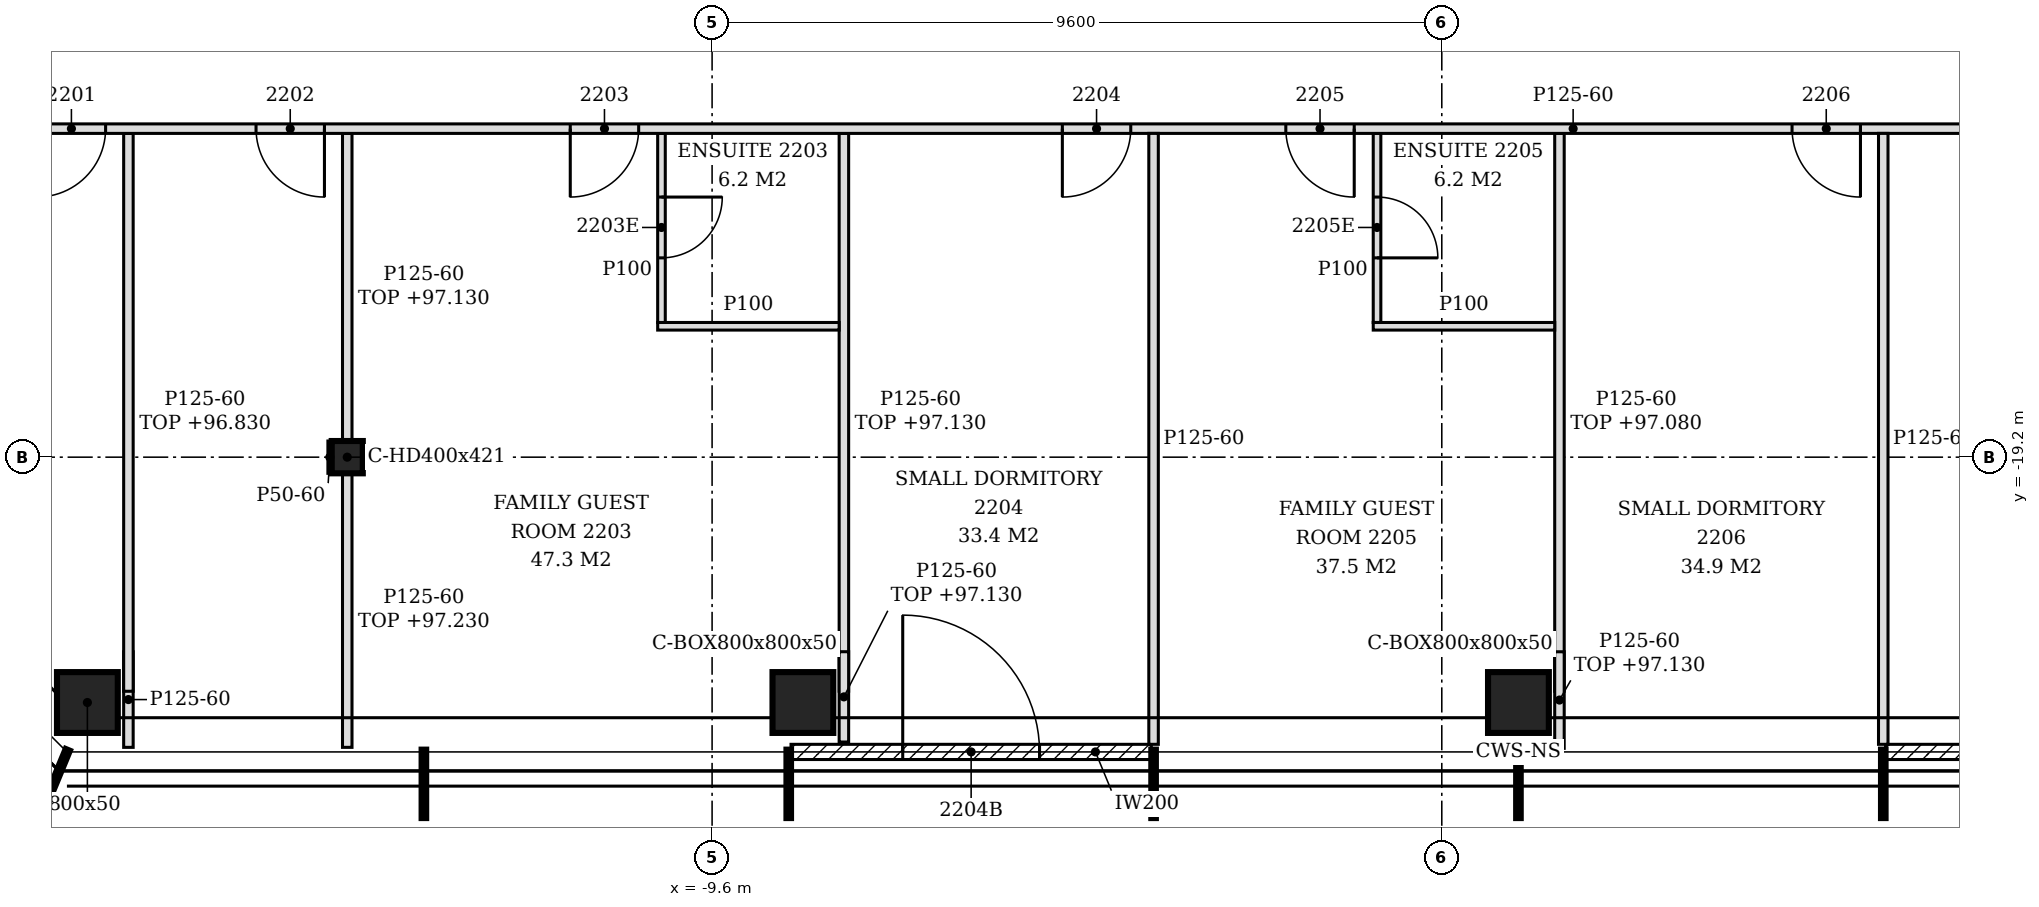
"""IFC4 building model, lengths in metres.
Left out: names, types, materials, properties, quantities, classifications, styles, units other than length and angle.
Written with IfcOpenShell. Run it as: python <this file> out.ifc"""

import sys

from ifc_helpers import new_model, si_unit, direction, frame, frame_2d, origin, origin_2d, place, context, subcontext, project, spatial, polyline, rectangle, hollow_rectangle, i_section, outline, extrude, clip, halfspace, element, fill, save


model = new_model("IFC4")
c1 = context("Model", 3, precision=1e-05, world=origin(), true_north=direction((0.0, 1.0)))
c2 = subcontext(c1, "Body", "Model", "MODEL_VIEW")
j1 = project(units=[si_unit("LENGTHUNIT", "METRE"), si_unit("PLANEANGLEUNIT", "RADIAN")], contexts=[c1])
p1 = place(None, origin())
s1 = spatial("IfcSite", under=j1, at=p1, CompositionType="ELEMENT")
p2 = place(p1, origin())
s2 = spatial("IfcBuilding", under=s1, at=p2, CompositionType="ELEMENT")
p3 = place(p2, frame((0.0, 0.0, 94.2)))
s3 = spatial("IfcBuildingStorey", under=s2, at=p3, CompositionType="ELEMENT", Elevation=94.2)
for number, where, z_axis, x_axis in (
    (1, (-17.819, -22.428, -0.15), (0.282, 0.188, 0.941), (-0.555, 0.832, 0.0)),
    (2, (-8.405, -22.428, -0.15), (0.282, 0.188, 0.941), (-0.555, 0.832, 0.0)),
    (3, (1.008, -22.428, -0.15), (0.282, 0.188, 0.941), (-0.555, 0.832, 0.0)),
):
    element("IfcColumn", number, at=place(p3, frame(where, z_axis=z_axis, x_axis=x_axis)), inside=s3, PredefinedType="COLUMN", context=c2, shape_type="Clipping", body=[
        clip(clip(extrude(hollow_rectangle(XDim=0.8, YDim=0.8, WallThickness=0.05, at=origin_2d()), origin(), (0.0, 0.0, 1.0), 3.826), halfspace(frame((0.0, 0.0, 0.024), z_axis=(0.0, 0.0, 1.0), x_axis=(1.0, 0.0, 0.0)), True)), halfspace(frame((0.0, 0.0, 3.802), z_axis=(0.0, 0.0, 1.0), x_axis=(1.0, 0.0, 0.0)), False)),
    ])
p4 = place(p3, frame((-14.4, -19.2, -0.15), z_axis=(0.0, 0.0, 1.0), x_axis=(1.0, 0.0, 0.0)))
e4 = element("IfcColumn", 4, at=p4, inside=s3, PredefinedType="COLUMN", context=c2, shape_type="SweptSolid", body=[
    extrude(i_section(OverallWidth=0.409, OverallDepth=0.425, WebThickness=0.033, FlangeThickness=0.052, FilletRadius=0.015, at=origin_2d()), origin(), (0.0, 0.0, 1.0), 3.6),
])
p5 = place(p3, frame((-8.562, -23.078, 0.0), z_axis=(0.0, 0.0, 1.0), x_axis=(1.0, 0.0, 0.0)))
e5 = element("IfcWall", 5, at=p5, inside=s3, PredefinedType="NOTDEFINED", context=c2, shape_type="SweptSolid", body=[
    extrude(rectangle(XDim=4.74, YDim=0.2, at=frame_2d((2.37, 0.0))), origin(), (0.0, 0.0, 1.0), 3.45),
])
p6 = place(p5, frame((1.47, 0.0, 0.0)))
e6 = element("IfcOpeningElement", 6, at=p6, cuts=e5, PredefinedType="OPENING", context=c2, shape_type="SweptSolid", body=[
    extrude(rectangle(XDim=1.8, YDim=2.4, at=frame_2d((0.9, 1.2))), frame((0.0, 0.11, 0.0), z_axis=(0.0, -1.0, 0.0), x_axis=(1.0, 0.0, 0.0)), (0.0, 0.0, 1.0), 0.22),
])
p7 = place(p3, frame((5.838, -23.078, 0.0), z_axis=(0.0, 0.0, 1.0), x_axis=(1.0, 0.0, 0.0)))
e7 = element("IfcWall", 7, at=p7, inside=s3, PredefinedType="NOTDEFINED", context=c2, shape_type="SweptSolid", body=[
    extrude(rectangle(XDim=4.74, YDim=0.2, at=frame_2d((2.37, 0.0))), origin(), (0.0, 0.0, 1.0), 3.45),
])
p8 = place(p7, frame((1.17, 0.0, 0.0)))
e8 = element("IfcOpeningElement", 8, at=p8, cuts=e7, PredefinedType="OPENING", context=c2, shape_type="SweptSolid", body=[
    extrude(rectangle(XDim=2.4, YDim=2.4, at=frame_2d((1.2, 1.2))), frame((0.0, 0.11, 0.0), z_axis=(0.0, -1.0, 0.0), x_axis=(1.0, 0.0, 0.0)), (0.0, 0.0, 1.0), 0.22),
])
p9 = place(p3, frame((-17.279, -23.018, 0.0), z_axis=(0.0, 0.0, 1.0), x_axis=(0.0, 1.0, 0.0)))
e9 = element("IfcWall", 9, at=p9, inside=s3, PredefinedType="PARTITIONING", context=c2, shape_type="SweptSolid", body=[
    extrude(outline(polyline([(0.0, 0.0), (0.427, 0.0), (0.427, 0.863), (0.427, 1.725), (0.697, 2.588), (1.257, 3.45), (0.0, 3.45), (0.0, 2.588), (0.0, 1.725), (0.0, 0.863), (0.0, 0.0)])), frame((0.0, 0.062, 0.0), z_axis=(0.0, -1.0, 0.0), x_axis=(1.0, 0.0, 0.0)), (0.0, 0.0, 1.0), 0.125),
])
p10 = place(p3, frame((-14.4, -23.018, 0.0), z_axis=(0.0, 0.0, 1.0), x_axis=(0.0, 1.0, 0.0)))
e10 = element("IfcWall", 10, at=p10, inside=s3, PredefinedType="PARTITIONING", context=c2, shape_type="SweptSolid", body=[
    extrude(outline(polyline([(0.0, 0.0), (3.605, 0.0), (3.605, 3.03), (1.459, 3.03), (1.457, 2.93), (1.159, 2.93), (1.157, 3.03), (0.0, 3.03), (0.0, 0.0)])), frame((0.0, 0.062, 0.0), z_axis=(0.0, -1.0, 0.0), x_axis=(1.0, 0.0, 0.0)), (0.0, 0.0, 1.0), 0.125),
])
p11 = place(p3, frame((-3.792, -22.978, 0.0), z_axis=(0.0, 0.0, 1.0), x_axis=(0.0, 1.0, 0.0)))
e11 = element("IfcWall", 11, at=p11, inside=s3, PredefinedType="PARTITIONING", context=c2, shape_type="SweptSolid", body=[
    extrude(outline(polyline([(0.0, 0.0), (8.037, 0.0), (8.037, 3.45), (5.274, 3.45), (5.272, 2.88), (5.064, 2.88), (5.062, 3.45), (1.419, 3.45), (1.417, 2.93), (1.119, 2.93), (1.117, 3.45), (0.0, 3.45), (0.0, 0.0)])), frame((0.0, 0.062, 0.0), z_axis=(0.0, -1.0, 0.0), x_axis=(1.0, 0.0, 0.0)), (0.0, 0.0, 1.0), 0.125),
])
p12 = place(p3, frame((1.548, -23.031, 0.0), z_axis=(0.0, 0.0, 1.0), x_axis=(0.0, 1.0, 0.0)))
e12 = element("IfcWall", 12, at=p12, inside=s3, PredefinedType="PARTITIONING", context=c2, shape_type="SweptSolid", body=[
    extrude(outline(polyline([(0.0, 0.0), (0.44, 0.0), (0.44, 0.863), (0.44, 1.725), (0.711, 2.588), (0.933, 2.93), (0.0, 2.93), (0.0, 2.588), (0.0, 1.725), (0.0, 0.863), (0.0, 0.0)])), frame((0.0, 0.062, 0.0), z_axis=(0.0, -1.0, 0.0), x_axis=(1.0, 0.0, 0.0)), (0.0, 0.0, 1.0), 0.125),
])
p13 = place(p3, frame((5.808, -22.978, 0.0), z_axis=(0.0, 0.0, 1.0), x_axis=(0.0, 1.0, 0.0)))
e13 = element("IfcWall", 13, at=p13, inside=s3, PredefinedType="PARTITIONING", context=c2, shape_type="SweptSolid", body=[
    extrude(outline(polyline([(0.0, 0.0), (8.037, 0.0), (8.037, 3.45), (5.274, 3.45), (5.272, 2.88), (5.064, 2.88), (5.062, 3.45), (1.419, 3.45), (1.417, 2.93), (1.119, 2.93), (1.117, 3.45), (0.0, 3.45), (0.0, 0.0)])), frame((0.0, 0.062, 0.0), z_axis=(0.0, -1.0, 0.0), x_axis=(1.0, 0.0, 0.0)), (0.0, 0.0, 1.0), 0.125),
])
p14 = place(p3, frame((-7.866, -22.948, 0.0), z_axis=(0.0, 0.0, 1.0), x_axis=(0.0, 1.0, 0.0)))
e14 = element("IfcWall", 14, at=p14, inside=s3, PredefinedType="PARTITIONING", context=c2, shape_type="SweptSolid", body=[
    extrude(outline(polyline([(0.0, 0.0), (0.357, 0.0), (0.357, 0.863), (0.357, 1.725), (0.628, 2.588), (0.851, 2.93), (0.0, 2.93), (0.0, 2.588), (0.0, 1.725), (0.0, 0.863), (0.0, 0.0)])), frame((0.0, 0.062, 0.0), z_axis=(0.0, -1.0, 0.0), x_axis=(1.0, 0.0, 0.0)), (0.0, 0.0, 1.0), 0.125),
])
p15 = place(p3, frame((-17.279, -22.28, 0.0), z_axis=(0.0, 0.0, 1.0), x_axis=(0.0, 1.0, 0.0)))
e15 = element("IfcWall", 15, at=p15, inside=s3, PredefinedType="PARTITIONING", context=c2, shape_type="SweptSolid", body=[
    extrude(outline(polyline([(0.0, 0.0), (7.339, 0.0), (7.339, 0.863), (7.339, 1.725), (7.339, 2.588), (7.339, 2.63), (0.734, 2.63), (0.734, 2.588), (0.734, 1.725), (0.56, 0.863), (0.0, 0.0)])), frame((0.0, 0.062, 0.0), z_axis=(0.0, -1.0, 0.0), x_axis=(1.0, 0.0, 0.0)), (0.0, 0.0, 1.0), 0.125),
])
p16 = place(p3, frame((-7.866, -22.279, 0.0), z_axis=(0.0, 0.0, 1.0), x_axis=(0.0, 1.0, 0.0)))
e16 = element("IfcWall", 16, at=p16, inside=s3, PredefinedType="PARTITIONING", context=c2, shape_type="SweptSolid", body=[
    extrude(outline(polyline([(0.0, 0.0), (7.338, 0.0), (7.338, 0.863), (7.338, 1.725), (7.338, 2.588), (7.338, 2.93), (0.733, 2.93), (0.733, 2.588), (0.733, 1.725), (0.56, 0.863), (0.0, 0.0)])), frame((0.0, 0.062, 0.0), z_axis=(0.0, -1.0, 0.0), x_axis=(1.0, 0.0, 0.0)), (0.0, 0.0, 1.0), 0.125),
])
p17 = place(p3, frame((1.548, -22.28, 0.0), z_axis=(0.0, 0.0, 1.0), x_axis=(0.0, 1.0, 0.0)))
e17 = element("IfcWall", 17, at=p17, inside=s3, PredefinedType="PARTITIONING", context=c2, shape_type="SweptSolid", body=[
    extrude(outline(polyline([(0.0, 0.0), (7.339, 0.0), (7.339, 0.863), (7.339, 1.725), (7.339, 2.588), (7.339, 2.88), (0.734, 2.88), (0.734, 2.588), (0.734, 1.725), (0.56, 0.863), (0.0, 0.0)])), frame((0.0, 0.062, 0.0), z_axis=(0.0, -1.0, 0.0), x_axis=(1.0, 0.0, 0.0)), (0.0, 0.0, 1.0), 0.125),
])
p18 = place(p3, frame((-14.4, -18.988, 0.0), z_axis=(0.0, 0.0, 1.0), x_axis=(0.0, 1.0, 0.0)))
e18 = element("IfcWall", 18, at=p18, inside=s3, PredefinedType="PARTITIONING", context=c2, shape_type="SweptSolid", body=[
    extrude(rectangle(XDim=4.047, YDim=0.125, at=frame_2d((2.023, 0.0))), origin(), (0.0, 0.0, 1.0), 2.93),
])
p19 = place(p3, frame((-10.316, -17.478, 0.0), z_axis=(0.0, 0.0, 1.0), x_axis=(1.0, 0.0, 0.0)))
e19 = element("IfcWall", 19, at=p19, inside=s3, PredefinedType="PARTITIONING", context=c2, shape_type="SweptSolid", body=[
    extrude(rectangle(XDim=2.387, YDim=0.1, at=frame_2d((1.194, 0.0))), origin(), (0.0, 0.0, 1.0), 3.45),
])
p20 = place(p3, frame((-0.902, -17.478, 0.0), z_axis=(0.0, 0.0, 1.0), x_axis=(1.0, 0.0, 0.0)))
e20 = element("IfcWall", 20, at=p20, inside=s3, PredefinedType="PARTITIONING", context=c2, shape_type="SweptSolid", body=[
    extrude(rectangle(XDim=2.388, YDim=0.1, at=frame_2d((1.194, 0.0))), origin(), (0.0, 0.0, 1.0), 3.45),
])
p21 = place(p3, frame((-10.266, -17.428, 0.0), z_axis=(0.0, 0.0, 1.0), x_axis=(0.0, 1.0, 0.0)))
e21 = element("IfcWall", 21, at=p21, inside=s3, PredefinedType="PARTITIONING", context=c2, shape_type="SweptSolid", body=[
    extrude(rectangle(XDim=2.488, YDim=0.1, at=frame_2d((1.244, 0.0))), origin(), (0.0, 0.0, 1.0), 3.45),
])
p22 = place(p21, frame((0.85, 0.0, 0.0)))
e22 = element("IfcOpeningElement", 22, at=p22, cuts=e21, PredefinedType="OPENING", context=c2, shape_type="SweptSolid", body=[
    extrude(rectangle(XDim=0.8, YDim=2.1, at=frame_2d((0.4, 1.05))), frame((0.0, 0.06, 0.0), z_axis=(0.0, -1.0, 0.0), x_axis=(1.0, 0.0, 0.0)), (0.0, 0.0, 1.0), 0.12),
])
p23 = place(p3, frame((-0.852, -17.428, 0.0), z_axis=(0.0, 0.0, 1.0), x_axis=(0.0, 1.0, 0.0)))
e23 = element("IfcWall", 23, at=p23, inside=s3, PredefinedType="PARTITIONING", context=c2, shape_type="SweptSolid", body=[
    extrude(rectangle(XDim=2.488, YDim=0.1, at=frame_2d((1.244, 0.0))), origin(), (0.0, 0.0, 1.0), 3.45),
])
p24 = place(p23, frame((0.85, 0.0, 0.0)))
e24 = element("IfcOpeningElement", 24, at=p24, cuts=e23, PredefinedType="OPENING", context=c2, shape_type="SweptSolid", body=[
    extrude(rectangle(XDim=0.8, YDim=2.1, at=frame_2d((0.4, 1.05))), frame((0.0, 0.06, 0.0), z_axis=(0.0, -1.0, 0.0), x_axis=(1.0, 0.0, 0.0)), (0.0, 0.0, 1.0), 0.12),
])
p25 = place(p3, frame((-19.342, -14.878, 0.0), z_axis=(0.0, 0.0, 1.0), x_axis=(1.0, 0.0, 0.0)))
e25 = element("IfcWall", 25, at=p25, inside=s3, PredefinedType="PARTITIONING", context=c2, shape_type="SweptSolid", body=[
    extrude(outline(polyline([(0.0, 0.0), (38.479, 0.0), (38.479, 2.73), (38.392, 2.73), (38.39, 3.45), (26.692, 3.45), (26.69, 2.73), (26.392, 2.73), (26.39, 3.45), (14.692, 3.45), (14.69, 2.73), (14.392, 2.73), (14.39, 3.45), (5.092, 3.45), (5.09, 2.93), (4.792, 2.93), (4.79, 3.45), (0.0, 3.45), (0.0, 0.0)])), frame((0.0, 0.062, 0.0), z_axis=(0.0, -1.0, 0.0), x_axis=(1.0, 0.0, 0.0)), (0.0, 0.0, 1.0), 0.125),
])
p26 = place(p25, frame((0.863, 0.0, 0.0)))
e26 = element("IfcOpeningElement", 26, at=p26, cuts=e25, PredefinedType="OPENING", context=c2, shape_type="SweptSolid", body=[
    extrude(rectangle(XDim=0.9, YDim=2.1, at=frame_2d((0.45, 1.05))), frame((0.0, 0.073, 0.0), z_axis=(0.0, -1.0, 0.0), x_axis=(1.0, 0.0, 0.0)), (0.0, 0.0, 1.0), 0.145),
])
p27 = place(p25, frame((3.742, 0.0, 0.0)))
e27 = element("IfcOpeningElement", 27, at=p27, cuts=e25, PredefinedType="OPENING", context=c2, shape_type="SweptSolid", body=[
    extrude(rectangle(XDim=0.9, YDim=2.1, at=frame_2d((0.45, 1.05))), frame((0.0, 0.073, 0.0), z_axis=(0.0, -1.0, 0.0), x_axis=(1.0, 0.0, 0.0)), (0.0, 0.0, 1.0), 0.145),
])
p28 = place(p25, frame((7.876, 0.0, 0.0)))
e28 = element("IfcOpeningElement", 28, at=p28, cuts=e25, PredefinedType="OPENING", context=c2, shape_type="SweptSolid", body=[
    extrude(rectangle(XDim=0.9, YDim=2.1, at=frame_2d((0.45, 1.05))), frame((0.0, 0.073, 0.0), z_axis=(0.0, -1.0, 0.0), x_axis=(1.0, 0.0, 0.0)), (0.0, 0.0, 1.0), 0.145),
])
p29 = place(p25, frame((14.35, 0.0, 0.0)))
e29 = element("IfcOpeningElement", 29, at=p29, cuts=e25, PredefinedType="OPENING", context=c2, shape_type="SweptSolid", body=[
    extrude(rectangle(XDim=0.9, YDim=2.1, at=frame_2d((0.45, 1.05))), frame((0.0, 0.073, 0.0), z_axis=(0.0, -1.0, 0.0), x_axis=(1.0, 0.0, 0.0)), (0.0, 0.0, 1.0), 0.145),
])
p30 = place(p25, frame((17.29, 0.0, 0.0)))
e30 = element("IfcOpeningElement", 30, at=p30, cuts=e25, PredefinedType="OPENING", context=c2, shape_type="SweptSolid", body=[
    extrude(rectangle(XDim=0.9, YDim=2.1, at=frame_2d((0.45, 1.05))), frame((0.0, 0.073, 0.0), z_axis=(0.0, -1.0, 0.0), x_axis=(1.0, 0.0, 0.0)), (0.0, 0.0, 1.0), 0.145),
])
p31 = place(p25, frame((23.95, 0.0, 0.0)))
e31 = element("IfcOpeningElement", 31, at=p31, cuts=e25, PredefinedType="OPENING", context=c2, shape_type="SweptSolid", body=[
    extrude(rectangle(XDim=0.9, YDim=2.1, at=frame_2d((0.45, 1.05))), frame((0.0, 0.073, 0.0), z_axis=(0.0, -1.0, 0.0), x_axis=(1.0, 0.0, 0.0)), (0.0, 0.0, 1.0), 0.145),
])
p32 = place(p25, frame((26.703, 0.0, 0.0)))
e32 = element("IfcOpeningElement", 32, at=p32, cuts=e25, PredefinedType="OPENING", context=c2, shape_type="SweptSolid", body=[
    extrude(rectangle(XDim=0.9, YDim=2.1, at=frame_2d((0.45, 1.05))), frame((0.0, 0.073, 0.0), z_axis=(0.0, -1.0, 0.0), x_axis=(1.0, 0.0, 0.0)), (0.0, 0.0, 1.0), 0.145),
])
p33 = place(p25, frame((30.65, 0.0, 0.0)))
e33 = element("IfcOpeningElement", 33, at=p33, cuts=e25, PredefinedType="OPENING", context=c2, shape_type="SweptSolid", body=[
    extrude(rectangle(XDim=0.9, YDim=2.1, at=frame_2d((0.45, 1.05))), frame((0.0, 0.073, 0.0), z_axis=(0.0, -1.0, 0.0), x_axis=(1.0, 0.0, 0.0)), (0.0, 0.0, 1.0), 0.145),
])
p34 = place(p25, frame((36.542, 0.0, 0.0)))
e34 = element("IfcOpeningElement", 34, at=p34, cuts=e25, PredefinedType="OPENING", context=c2, shape_type="SweptSolid", body=[
    extrude(rectangle(XDim=0.9, YDim=2.1, at=frame_2d((0.45, 1.05))), frame((0.0, 0.073, 0.0), z_axis=(0.0, -1.0, 0.0), x_axis=(1.0, 0.0, 0.0)), (0.0, 0.0, 1.0), 0.145),
])
p35 = place(p3, frame((-14.629, -19.413, 0.0), z_axis=(0.0, 0.0, 1.0), x_axis=(0.0, 1.0, 0.0)))
e35 = element("IfcWall", 35, at=p35, inside=s3, PredefinedType="PARTITIONING", context=c2, shape_type="SweptSolid", body=[
    extrude(rectangle(XDim=0.425, YDim=0.05, at=frame_2d((0.212, 0.0))), origin(), (0.0, 0.0, 1.0), 3.45),
])
p36 = place(p6, origin())
e36 = element("IfcDoor", 36, at=p36, inside=s3, OperationType="SINGLE_SWING_LEFT", PredefinedType="DOOR", context=c2, shape_type="SweptSolid", body=[
    extrude(rectangle(XDim=1.8, YDim=2.4, at=frame_2d((0.9, 1.2))), frame((0.0, 0.025, 0.0), z_axis=(0.0, -1.0, 0.0), x_axis=(1.0, 0.0, 0.0)), (0.0, 0.0, 1.0), 0.05),
])
fill(e6, e36)
p37 = place(p26, frame((0.9, 0.0, 0.0), z_axis=(0.0, 0.0, 1.0), x_axis=(-1.0, 0.0, 0.0)))
e37 = element("IfcDoor", 37, at=p37, inside=s3, OperationType="SINGLE_SWING_RIGHT", PredefinedType="DOOR", context=c2, shape_type="SweptSolid", body=[
    extrude(rectangle(XDim=0.9, YDim=2.1, at=frame_2d((0.45, 1.05))), frame((0.0, 0.025, 0.0), z_axis=(0.0, -1.0, 0.0), x_axis=(1.0, 0.0, 0.0)), (0.0, 0.0, 1.0), 0.05),
])
fill(e26, e37)
p38 = place(p27, frame((0.9, 0.0, 0.0), z_axis=(0.0, 0.0, 1.0), x_axis=(-1.0, 0.0, 0.0)))
e38 = element("IfcDoor", 38, at=p38, inside=s3, OperationType="SINGLE_SWING_LEFT", PredefinedType="DOOR", context=c2, shape_type="SweptSolid", body=[
    extrude(rectangle(XDim=0.9, YDim=2.1, at=frame_2d((0.45, 1.05))), frame((0.0, 0.025, 0.0), z_axis=(0.0, -1.0, 0.0), x_axis=(1.0, 0.0, 0.0)), (0.0, 0.0, 1.0), 0.05),
])
fill(e27, e38)
p39 = place(p28, frame((0.9, 0.0, 0.0), z_axis=(0.0, 0.0, 1.0), x_axis=(-1.0, 0.0, 0.0)))
e39 = element("IfcDoor", 39, at=p39, inside=s3, OperationType="SINGLE_SWING_RIGHT", PredefinedType="DOOR", context=c2, shape_type="SweptSolid", body=[
    extrude(rectangle(XDim=0.9, YDim=2.1, at=frame_2d((0.45, 1.05))), frame((0.0, 0.025, 0.0), z_axis=(0.0, -1.0, 0.0), x_axis=(1.0, 0.0, 0.0)), (0.0, 0.0, 1.0), 0.05),
])
fill(e28, e39)
p40 = place(p22, frame((0.8, 0.0, 0.0), z_axis=(0.0, 0.0, 1.0), x_axis=(-1.0, 0.0, 0.0)))
e40 = element("IfcDoor", 40, at=p40, inside=s3, OperationType="SINGLE_SWING_LEFT", PredefinedType="DOOR", context=c2, shape_type="SweptSolid", body=[
    extrude(rectangle(XDim=0.8, YDim=2.1, at=frame_2d((0.4, 1.05))), frame((0.0, 0.025, 0.0), z_axis=(0.0, -1.0, 0.0), x_axis=(1.0, 0.0, 0.0)), (0.0, 0.0, 1.0), 0.05),
])
fill(e22, e40)
p41 = place(p29, frame((0.9, 0.0, 0.0), z_axis=(0.0, 0.0, 1.0), x_axis=(-1.0, 0.0, 0.0)))
e41 = element("IfcDoor", 41, at=p41, inside=s3, OperationType="SINGLE_SWING_RIGHT", PredefinedType="DOOR", context=c2, shape_type="SweptSolid", body=[
    extrude(rectangle(XDim=0.9, YDim=2.1, at=frame_2d((0.45, 1.05))), frame((0.0, 0.025, 0.0), z_axis=(0.0, -1.0, 0.0), x_axis=(1.0, 0.0, 0.0)), (0.0, 0.0, 1.0), 0.05),
])
fill(e29, e41)
p42 = place(p30, frame((0.9, 0.0, 0.0), z_axis=(0.0, 0.0, 1.0), x_axis=(-1.0, 0.0, 0.0)))
e42 = element("IfcDoor", 42, at=p42, inside=s3, OperationType="SINGLE_SWING_LEFT", PredefinedType="DOOR", context=c2, shape_type="SweptSolid", body=[
    extrude(rectangle(XDim=0.9, YDim=2.1, at=frame_2d((0.45, 1.05))), frame((0.0, 0.025, 0.0), z_axis=(0.0, -1.0, 0.0), x_axis=(1.0, 0.0, 0.0)), (0.0, 0.0, 1.0), 0.05),
])
fill(e30, e42)
p43 = place(p24, frame((0.8, 0.0, 0.0), z_axis=(0.0, 0.0, 1.0), x_axis=(-1.0, 0.0, 0.0)))
e43 = element("IfcDoor", 43, at=p43, inside=s3, OperationType="SINGLE_SWING_RIGHT", PredefinedType="DOOR", context=c2, shape_type="SweptSolid", body=[
    extrude(rectangle(XDim=0.8, YDim=2.1, at=frame_2d((0.4, 1.05))), frame((0.0, 0.025, 0.0), z_axis=(0.0, -1.0, 0.0), x_axis=(1.0, 0.0, 0.0)), (0.0, 0.0, 1.0), 0.05),
])
fill(e24, e43)
p44 = place(p31, frame((0.9, 0.0, 0.0), z_axis=(0.0, 0.0, 1.0), x_axis=(-1.0, 0.0, 0.0)))
e44 = element("IfcDoor", 44, at=p44, inside=s3, OperationType="SINGLE_SWING_LEFT", PredefinedType="DOOR", context=c2, shape_type="SweptSolid", body=[
    extrude(rectangle(XDim=0.9, YDim=2.1, at=frame_2d((0.45, 1.05))), frame((0.0, 0.025, 0.0), z_axis=(0.0, -1.0, 0.0), x_axis=(1.0, 0.0, 0.0)), (0.0, 0.0, 1.0), 0.05),
])
fill(e31, e44)
save(model, sys.argv[1])
